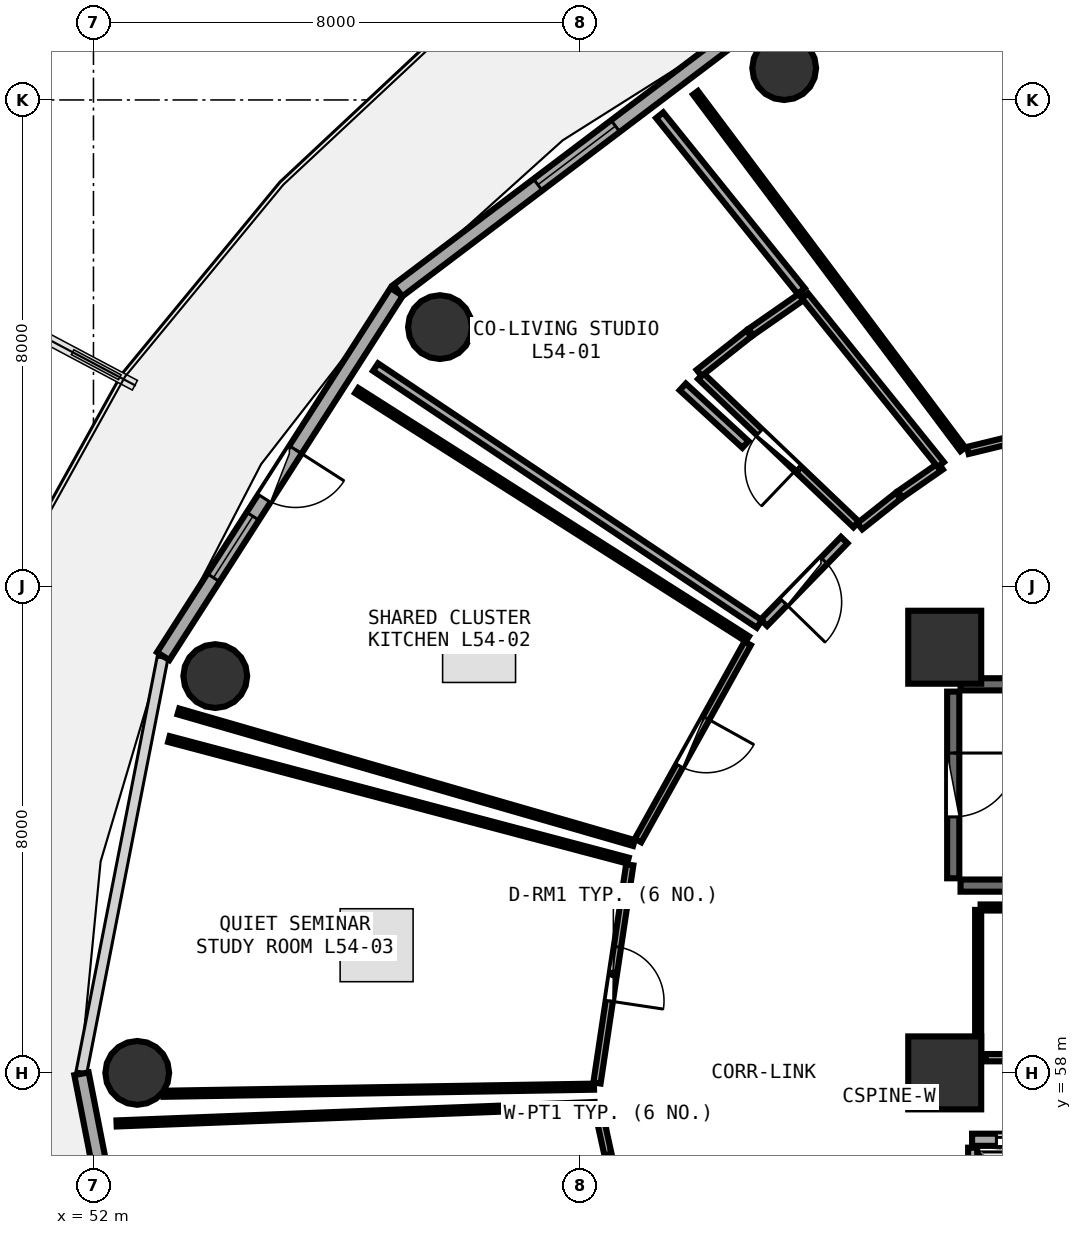
"""IFC4 building model, lengths in metres.
Left out: names, types, materials, properties, quantities, classifications, styles, units other than length and angle.
Written with IfcOpenShell. Run it as: python <this file> out.ifc"""

import sys

from ifc_helpers import new_model, si_unit, direction, frame, frame_2d, origin, origin_2d, place, context, subcontext, project, spatial, rectangle, circle, extrude, element, fill, save


model = new_model("IFC4")
c1 = context("Model", 3, precision=1e-05, world=origin(), true_north=direction((0.0, 1.0)))
c2 = subcontext(c1, "Body", "Model", "MODEL_VIEW")
j1 = project(units=[si_unit("LENGTHUNIT", "METRE"), si_unit("PLANEANGLEUNIT", "RADIAN")], contexts=[c1])
p1 = place(None, origin())
s1 = spatial("IfcSite", under=j1, at=p1, CompositionType="ELEMENT")
p2 = place(p1, origin())
s2 = spatial("IfcBuilding", under=s1, at=p2, CompositionType="ELEMENT")
p3 = place(p2, frame((0.0, 0.0, 211.95)))
s3 = spatial("IfcBuildingStorey", under=s2, at=p3, CompositionType="ELEMENT", Elevation=211.95)
for number, where, z_axis, x_axis in (
    (1, (66.0, 65.0, 0.0), (0.0, 0.0, 1.0), (1.0, 0.0, 0.0)),
    (2, (66.0, 58.0, 0.0), (0.0, 0.0, 1.0), (1.0, 0.0, 0.0)),
):
    element("IfcColumn", number, at=place(p3, frame(where, z_axis=z_axis, x_axis=x_axis)), inside=s3, PredefinedType="PILASTER", context=c2, shape_type="SweptSolid", body=[
        extrude(rectangle(XDim=1.2, YDim=1.2, at=origin_2d()), origin(), (0.0, 0.0, 1.0), 3.75),
    ])
for number, where, z_axis, x_axis in (
    (3, (63.36, 74.524, 0.0), (0.0, 0.0, 1.0), (1.0, 0.0, 0.0)),
    (4, (57.698, 70.264, 0.0), (0.0, 0.0, 1.0), (1.0, 0.0, 0.0)),
    (5, (54.003, 64.526, 0.0), (0.0, 0.0, 1.0), (1.0, 0.0, 0.0)),
    (6, (52.72, 58.0, 0.0), (0.0, 0.0, 1.0), (1.0, 0.0, 0.0)),
):
    element("IfcColumn", number, at=place(p3, frame(where, z_axis=z_axis, x_axis=x_axis)), inside=s3, PredefinedType="COLUMN", context=c2, shape_type="SweptSolid", body=[
        extrude(circle(Radius=0.525, at=origin_2d()), origin(), (0.0, 0.0, 1.0), 3.75),
    ])
p4 = place(p3, frame((62.888, 75.312, 0.0), z_axis=(0.0, 0.0, 1.0), x_axis=(-0.797701674595, -0.603052268338, 0.0)))
e7 = element("IfcWall", 7, at=p4, inside=s3, PredefinedType="SOLIDWALL", context=c2, shape_type="SweptSolid", body=[
    extrude(rectangle(XDim=7.374, YDim=0.24, at=frame_2d((3.687, 0.0))), origin(), (0.0, 0.0, 1.0), 3.475),
])
p5 = place(p4, frame((2.887, 0.0, 0.85)))
e8 = element("IfcOpeningElement", 8, at=p5, cuts=e7, PredefinedType="OPENING", context=c2, shape_type="SweptSolid", body=[
    extrude(rectangle(XDim=1.6, YDim=1.45, at=frame_2d((0.8, 0.725))), frame((0.0, 0.13, 0.0), z_axis=(0.0, -1.0, 0.0), x_axis=(1.0, 0.0, 0.0)), (0.0, 0.0, 1.0), 0.26),
])
p6 = place(p3, frame((56.986, 70.843, 0.0), z_axis=(0.0, 0.0, 1.0), x_axis=(-0.539539512973, -0.841960280501, 0.0)))
e9 = element("IfcWall", 9, at=p6, inside=s3, PredefinedType="SOLIDWALL", context=c2, shape_type="SweptSolid", body=[
    extrude(rectangle(XDim=7.115, YDim=0.24, at=frame_2d((3.557, 0.0))), origin(), (0.0, 0.0, 1.0), 3.475),
])
p7 = place(p6, frame((3.082, 0.0, 0.0)))
e10 = element("IfcOpeningElement", 10, at=p7, cuts=e9, PredefinedType="OPENING", context=c2, shape_type="SweptSolid", body=[
    extrude(rectangle(XDim=0.95, YDim=2.1, at=frame_2d((0.475, 1.05))), frame((0.0, 0.13, 0.0), z_axis=(0.0, -1.0, 0.0), x_axis=(1.0, 0.0, 0.0)), (0.0, 0.0, 1.0), 0.26),
])
p8 = place(p6, frame((4.382, 0.0, 0.85)))
e11 = element("IfcOpeningElement", 11, at=p8, cuts=e9, PredefinedType="OPENING", context=c2, shape_type="SweptSolid", body=[
    extrude(rectangle(XDim=1.2, YDim=1.45, at=frame_2d((0.6, 0.725))), frame((0.0, 0.13, 0.0), z_axis=(0.0, -1.0, 0.0), x_axis=(1.0, 0.0, 0.0)), (0.0, 0.0, 1.0), 0.26),
])
p9 = place(p3, frame((51.803, 57.985, 0.0), z_axis=(0.0, 0.0, 1.0), x_axis=(0.192069055673, -0.981381413036, 0.0)))
e12 = element("IfcWall", 12, at=p9, inside=s3, PredefinedType="SOLIDWALL", context=c2, shape_type="SweptSolid", body=[
    extrude(rectangle(XDim=6.94, YDim=0.24, at=frame_2d((3.47, 0.0))), origin(), (0.0, 0.0, 1.0), 3.475),
])
p10 = place(p9, frame((2.67, 0.0, 0.85)))
e13 = element("IfcOpeningElement", 13, at=p10, cuts=e12, PredefinedType="OPENING", context=c2, shape_type="SweptSolid", body=[
    extrude(rectangle(XDim=1.6, YDim=1.45, at=frame_2d((0.8, 0.725))), frame((0.0, 0.13, 0.0), z_axis=(0.0, -1.0, 0.0), x_axis=(1.0, 0.0, 0.0)), (0.0, 0.0, 1.0), 0.26),
])
for number, where, z_axis, x_axis in (
    (14, (66.26, 61.08, 0.0), (0.0, 0.0, 1.0), (1.0, 0.0, 0.0)),
    (15, (73.42, 64.39, 0.0), (0.0, 0.0, 1.0), (-1.0, 0.0, 0.0)),
):
    element("IfcWall", number, at=place(p3, frame(where, z_axis=z_axis, x_axis=x_axis)), inside=s3, PredefinedType="SHEAR", context=c2, shape_type="SweptSolid", body=[
        extrude(rectangle(XDim=7.16, YDim=0.2, at=frame_2d((3.58, 0.0))), origin(), (0.0, 0.0, 1.0), 3.49),
    ])
p11 = place(p3, frame((66.14, 64.27, 0.0), z_axis=(0.0, 0.0, 1.0), x_axis=(0.0, -1.0, 0.0)))
e16 = element("IfcWall", 16, at=p11, inside=s3, PredefinedType="SHEAR", context=c2, shape_type="SweptSolid", body=[
    extrude(rectangle(XDim=3.07, YDim=0.2, at=frame_2d((1.535, 0.0))), origin(), (0.0, 0.0, 1.0), 3.49),
])
p12 = place(p11, frame((1.01, 0.0, 0.0)))
e17 = element("IfcOpeningElement", 17, at=p12, cuts=e16, PredefinedType="OPENING", context=c2, shape_type="SweptSolid", body=[
    extrude(rectangle(XDim=1.05, YDim=2.1, at=frame_2d((0.525, 1.05))), frame((0.0, 0.11, 0.0), z_axis=(0.0, -1.0, 0.0), x_axis=(1.0, 0.0, 0.0)), (0.0, 0.0, 1.0), 0.22),
])
p13 = place(p3, frame((66.45, 56.9, 0.0), z_axis=(0.0, 0.0, 1.0), x_axis=(1.0, 0.0, 0.0)))
e18 = element("IfcWall", 18, at=p13, inside=s3, PredefinedType="SOLIDWALL", context=c2, shape_type="SweptSolid", body=[
    extrude(rectangle(XDim=14.4, YDim=0.2, at=frame_2d((7.2, 0.0))), origin(), (0.0, 0.0, 1.0), 3.48),
])
p14 = place(p13, frame((0.4, 0.0, 0.0)))
e19 = element("IfcOpeningElement", 19, at=p14, cuts=e18, PredefinedType="OPENING", context=c2, shape_type="SweptSolid", body=[
    extrude(rectangle(XDim=1.1, YDim=2.1, at=frame_2d((0.55, 1.05))), frame((0.0, 0.11, 0.0), z_axis=(0.0, -1.0, 0.0), x_axis=(1.0, 0.0, 0.0)), (0.0, 0.0, 1.0), 0.22),
])
p15 = place(p13, frame((2.4, 0.0, 0.0)))
e20 = element("IfcOpeningElement", 20, at=p15, cuts=e18, PredefinedType="OPENING", context=c2, shape_type="SweptSolid", body=[
    extrude(rectangle(XDim=1.1, YDim=2.1, at=frame_2d((0.55, 1.05))), frame((0.0, 0.11, 0.0), z_axis=(0.0, -1.0, 0.0), x_axis=(1.0, 0.0, 0.0)), (0.0, 0.0, 1.0), 0.22),
])
p16 = place(p13, frame((4.4, 0.0, 0.0)))
e21 = element("IfcOpeningElement", 21, at=p16, cuts=e18, PredefinedType="OPENING", context=c2, shape_type="SweptSolid", body=[
    extrude(rectangle(XDim=1.1, YDim=2.1, at=frame_2d((0.55, 1.05))), frame((0.0, 0.11, 0.0), z_axis=(0.0, -1.0, 0.0), x_axis=(1.0, 0.0, 0.0)), (0.0, 0.0, 1.0), 0.22),
])
p17 = place(p3, frame((66.46, 54.48, 0.0), z_axis=(0.0, 0.0, 1.0), x_axis=(0.0, 1.0, 0.0)))
e22 = element("IfcWall", 22, at=p17, inside=s3, PredefinedType="PARTITIONING", context=c2, shape_type="SweptSolid", body=[
    extrude(rectangle(XDim=2.29, YDim=0.15, at=frame_2d((1.145, 0.0))), origin(), (0.0, 0.0, 1.0), 3.48),
])
p18 = place(p3, frame((66.675, 58.25, 0.0), z_axis=(0.0, 0.0, 1.0), x_axis=(1.0, 0.0, 0.0)))
e23 = element("IfcWall", 23, at=p18, inside=s3, PredefinedType="PARTITIONING", context=c2, shape_type="SweptSolid", body=[
    extrude(rectangle(XDim=3.265, YDim=0.12, at=frame_2d((1.632, 0.0))), origin(), (0.0, 0.0, 1.0), 3.48),
])
p19 = place(p18, frame((1.182, 0.0, 0.0)))
e24 = element("IfcOpeningElement", 24, at=p19, cuts=e23, PredefinedType="OPENING", context=c2, shape_type="SweptSolid", body=[
    extrude(rectangle(XDim=0.9, YDim=2.08, at=frame_2d((0.45, 1.04))), frame((0.0, 0.07, 0.0), z_axis=(0.0, -1.0, 0.0), x_axis=(1.0, 0.0, 0.0)), (0.0, 0.0, 1.0), 0.14),
])
p20 = place(p3, frame((74.84, 70.29, 0.0), z_axis=(0.0, 0.0, 1.0), x_axis=(-0.971771434763, -0.235924306884, 0.0)))
e25 = element("IfcWall", 25, at=p20, inside=s3, PredefinedType="PARTITIONING", context=c2, shape_type="SweptSolid", body=[
    extrude(rectangle(XDim=8.705, YDim=0.12, at=frame_2d((4.353, 0.0))), origin(), (0.0, 0.0, 1.0), 3.025),
])
p21 = place(p20, frame((3.903, 0.0, 0.0)))
e26 = element("IfcOpeningElement", 26, at=p21, cuts=e25, PredefinedType="OPENING", context=c2, shape_type="SweptSolid", body=[
    extrude(rectangle(XDim=0.9, YDim=2.08, at=frame_2d((0.45, 1.04))), frame((0.0, 0.07, 0.0), z_axis=(0.0, -1.0, 0.0), x_axis=(1.0, 0.0, 0.0)), (0.0, 0.0, 1.0), 0.14),
])
p22 = place(p3, frame((64.545, 67.018, 0.0), z_axis=(0.0, 0.0, 1.0), x_axis=(-0.723495138875, 0.690329474979, 0.0)))
e27 = element("IfcWall", 27, at=p22, inside=s3, PredefinedType="PLUMBINGWALL", context=c2, shape_type="SweptSolid", body=[
    extrude(rectangle(XDim=3.533, YDim=0.13, at=frame_2d((1.767, 0.0))), origin(), (0.0, 0.0, 1.0), 3.175),
])
p23 = place(p22, frame((1.337, 0.0, 0.0)))
e28 = element("IfcOpeningElement", 28, at=p23, cuts=e27, PredefinedType="OPENING", context=c2, shape_type="SweptSolid", body=[
    extrude(rectangle(XDim=0.86, YDim=2.05, at=frame_2d((0.43, 1.025))), frame((0.0, 0.075, 0.0), z_axis=(0.0, -1.0, 0.0), x_axis=(1.0, 0.0, 0.0)), (0.0, 0.0, 1.0), 0.15),
])
p24 = place(p3, frame((64.347, 66.762, 0.0), z_axis=(0.0, 0.0, 1.0), x_axis=(-0.697118859216, -0.716955574722, 0.0)))
e29 = element("IfcWall", 29, at=p24, inside=s3, PredefinedType="PARTITIONING", context=c2, shape_type="SweptSolid", body=[
    extrude(rectangle(XDim=1.895, YDim=0.15, at=frame_2d((0.948, 0.0))), origin(), (0.0, 0.0, 1.0), 3.025),
])
p25 = place(p24, frame((0.473, 0.0, 0.0)))
e30 = element("IfcOpeningElement", 30, at=p25, cuts=e29, PredefinedType="OPENING", context=c2, shape_type="SweptSolid", body=[
    extrude(rectangle(XDim=0.95, YDim=2.08, at=frame_2d((0.475, 1.04))), frame((0.0, 0.085, 0.0), z_axis=(0.0, -1.0, 0.0), x_axis=(1.0, 0.0, 0.0)), (0.0, 0.0, 1.0), 0.17),
])
p26 = place(p3, frame((62.759, 65.064, 0.0), z_axis=(0.0, 0.0, 1.0), x_axis=(-0.485877595764, -0.874026865683, 0.0)))
e31 = element("IfcWall", 31, at=p26, inside=s3, PredefinedType="PARTITIONING", context=c2, shape_type="SweptSolid", body=[
    extrude(rectangle(XDim=3.71, YDim=0.12, at=frame_2d((1.855, 0.0))), origin(), (0.0, 0.0, 1.0), 3.025),
])
p27 = place(p26, frame((1.405, 0.0, 0.0)))
e32 = element("IfcOpeningElement", 32, at=p27, cuts=e31, PredefinedType="OPENING", context=c2, shape_type="SweptSolid", body=[
    extrude(rectangle(XDim=0.9, YDim=2.08, at=frame_2d((0.45, 1.04))), frame((0.0, 0.07, 0.0), z_axis=(0.0, -1.0, 0.0), x_axis=(1.0, 0.0, 0.0)), (0.0, 0.0, 1.0), 0.14),
])
p28 = place(p3, frame((60.82, 61.422, 0.0), z_axis=(0.0, 0.0, 1.0), x_axis=(-0.148557592641, -0.988903757536, 0.0)))
e33 = element("IfcWall", 33, at=p28, inside=s3, PredefinedType="PARTITIONING", context=c2, shape_type="SweptSolid", body=[
    extrude(rectangle(XDim=3.629, YDim=0.12, at=frame_2d((1.814, 0.0))), origin(), (0.0, 0.0, 1.0), 3.025),
])
p29 = place(p28, frame((1.364, 0.0, 0.0)))
e34 = element("IfcOpeningElement", 34, at=p29, cuts=e33, PredefinedType="OPENING", context=c2, shape_type="SweptSolid", body=[
    extrude(rectangle(XDim=0.9, YDim=2.08, at=frame_2d((0.45, 1.04))), frame((0.0, 0.07, 0.0), z_axis=(0.0, -1.0, 0.0), x_axis=(1.0, 0.0, 0.0)), (0.0, 0.0, 1.0), 0.14),
])
p30 = place(p3, frame((60.296, 57.414, 0.0), z_axis=(0.0, 0.0, 1.0), x_axis=(0.214769597133, -0.976664742963, 0.0)))
e35 = element("IfcWall", 35, at=p30, inside=s3, PredefinedType="PARTITIONING", context=c2, shape_type="SweptSolid", body=[
    extrude(rectangle(XDim=3.638, YDim=0.12, at=frame_2d((1.819, 0.0))), origin(), (0.0, 0.0, 1.0), 3.48),
])
p31 = place(p30, frame((1.369, 0.0, 0.0)))
e36 = element("IfcOpeningElement", 36, at=p31, cuts=e35, PredefinedType="OPENING", context=c2, shape_type="SweptSolid", body=[
    extrude(rectangle(XDim=0.9, YDim=2.08, at=frame_2d((0.45, 1.04))), frame((0.0, 0.07, 0.0), z_axis=(0.0, -1.0, 0.0), x_axis=(1.0, 0.0, 0.0)), (0.0, 0.0, 1.0), 0.14),
])
p32 = place(p3, frame((69.96, 60.72, 0.0), z_axis=(0.0, 0.0, 1.0), x_axis=(-1.0, 0.0, 0.0)))
e37 = element("IfcWall", 37, at=p32, inside=s3, PredefinedType="PARTITIONING", context=c2, shape_type="SweptSolid", body=[
    extrude(rectangle(XDim=3.37, YDim=0.1, at=frame_2d((1.685, 0.0))), origin(), (0.0, 0.0, 1.0), 3.48),
])
p33 = place(p3, frame((66.55, 60.68, 0.0), z_axis=(0.0, 0.0, 1.0), x_axis=(0.0, -1.0, 0.0)))
e38 = element("IfcWall", 38, at=p33, inside=s3, PredefinedType="PARTITIONING", context=c2, shape_type="SweptSolid", body=[
    extrude(rectangle(XDim=2.383, YDim=0.1, at=frame_2d((1.191, 0.0))), origin(), (0.0, 0.0, 1.0), 3.48),
])
p34 = place(p3, frame((66.298, 68.254, 0.0), z_axis=(0.0, 0.0, 1.0), x_axis=(-0.599930714763, 0.80005195924, 0.0)))
e39 = element("IfcWall", 39, at=p34, inside=s3, PredefinedType="PARTITIONING", context=c2, shape_type="SweptSolid", body=[
    extrude(rectangle(XDim=7.33, YDim=0.1, at=frame_2d((3.665, 0.0))), origin(), (0.0, 0.0, 1.0), 3.025),
])
p35 = place(p3, frame((65.933, 67.977, 0.0), z_axis=(0.0, 0.0, 1.0), x_axis=(-0.821107527055, -0.570773535663, 0.0)))
e40 = element("IfcWall", 40, at=p35, inside=s3, PredefinedType="PLUMBINGWALL", context=c2, shape_type="SweptSolid", body=[
    extrude(rectangle(XDim=0.812, YDim=0.13, at=frame_2d((0.406, 0.0))), origin(), (0.0, 0.0, 1.0), 3.025),
])
p36 = place(p3, frame((65.234, 67.49, 0.0), z_axis=(0.0, 0.0, 1.0), x_axis=(-0.783584251465, -0.621285538908, 0.0)))
e41 = element("IfcWall", 41, at=p36, inside=s3, PredefinedType="PLUMBINGWALL", context=c2, shape_type="SweptSolid", body=[
    extrude(rectangle(XDim=0.805, YDim=0.13, at=frame_2d((0.402, 0.0))), origin(), (0.0, 0.0, 1.0), 3.025),
])
p37 = place(p3, frame((61.961, 69.511, 0.0), z_axis=(0.0, 0.0, 1.0), x_axis=(0.784079055359, 0.620660966186, 0.0)))
e42 = element("IfcWall", 42, at=p37, inside=s3, PredefinedType="PLUMBINGWALL", context=c2, shape_type="SweptSolid", body=[
    extrude(rectangle(XDim=1.043, YDim=0.13, at=frame_2d((0.521, 0.0))), origin(), (0.0, 0.0, 1.0), 3.48),
])
p38 = place(p3, frame((62.81, 70.182, 0.0), z_axis=(0.0, 0.0, 1.0), x_axis=(0.820692025527, 0.571370807127, 0.0)))
e43 = element("IfcWall", 43, at=p38, inside=s3, PredefinedType="PLUMBINGWALL", context=c2, shape_type="SweptSolid", body=[
    extrude(rectangle(XDim=1.051, YDim=0.13, at=frame_2d((0.525, 0.0))), origin(), (0.0, 0.0, 1.0), 3.48),
])
p39 = place(p3, frame((63.701, 70.778, 0.0), z_axis=(0.0, 0.0, 1.0), x_axis=(0.627323766187, -0.778758558461, 0.0)))
e44 = element("IfcWall", 44, at=p39, inside=s3, PredefinedType="PLUMBINGWALL", context=c2, shape_type="SweptSolid", body=[
    extrude(rectangle(XDim=3.563, YDim=0.13, at=frame_2d((1.781, 0.0))), origin(), (0.0, 0.0, 1.0), 3.025),
])
p40 = place(p3, frame((62.951, 65.382, 0.0), z_axis=(0.0, 0.0, 1.0), x_axis=(-0.831079650143, 0.556153409697, 0.0)))
e45 = element("IfcWall", 45, at=p40, inside=s3, PredefinedType="PARTITIONING", context=c2, shape_type="SweptSolid", body=[
    extrude(rectangle(XDim=7.594, YDim=0.15, at=frame_2d((3.797, 0.0))), origin(), (0.0, 0.0, 1.0), 3.075),
])
p41 = place(p3, frame((61.312, 73.749, 0.0), z_axis=(0.0, 0.0, 1.0), x_axis=(0.627090198143, -0.778946649901, 0.0)))
e46 = element("IfcWall", 46, at=p41, inside=s3, PredefinedType="PARTITIONING", context=c2, shape_type="SweptSolid", body=[
    extrude(rectangle(XDim=3.712, YDim=0.15, at=frame_2d((1.856, 0.0))), origin(), (0.0, 0.0, 1.0), 3.075),
])
p42 = place(p3, frame((61.691, 69.281, 0.0), z_axis=(0.0, 0.0, 1.0), x_axis=(0.736726740779, -0.676190586611, 0.0)))
e47 = element("IfcWall", 47, at=p42, inside=s3, PredefinedType="PARTITIONING", context=c2, shape_type="SweptSolid", body=[
    extrude(rectangle(XDim=1.399, YDim=0.15, at=frame_2d((0.7, 0.0))), origin(), (0.0, 0.0, 1.0), 3.175),
])
p43 = place(p3, frame((60.889, 61.78, 0.0), z_axis=(0.0, 0.0, 1.0), x_axis=(-0.960734399679, 0.277469661899, 0.0)))
e48 = element("IfcWall", 48, at=p43, inside=s3, PredefinedType="PARTITIONING", context=c2, shape_type="SweptSolid", body=[
    extrude(rectangle(XDim=7.798, YDim=0.1, at=frame_2d((3.899, 0.0))), origin(), (0.0, 0.0, 1.0), 3.075),
])
p44 = place(p3, frame((56.329, 69.221, 0.0), z_axis=(0.0, 0.0, 1.0), x_axis=(0.843949218332, -0.536423076383, 0.0)))
e49 = element("IfcWall", 49, at=p44, inside=s3, PredefinedType="PARTITIONING", context=c2, shape_type="SweptSolid", body=[
    extrude(rectangle(XDim=7.613, YDim=0.1, at=frame_2d((3.807, 0.0))), origin(), (0.0, 0.0, 1.0), 3.075),
])
p45 = place(p3, frame((60.232, 57.773, 0.0), z_axis=(0.0, 0.0, 1.0), x_axis=(-0.999864271248, -0.016475408379, 0.0)))
e50 = element("IfcWall", 50, at=p45, inside=s3, PredefinedType="PARTITIONING", context=c2, shape_type="SweptSolid", body=[
    extrude(rectangle(XDim=7.083, YDim=0.1, at=frame_2d((3.542, 0.0))), origin(), (0.0, 0.0, 1.0), 3.175),
])
p46 = place(p3, frame((53.241, 63.49, 0.0), z_axis=(0.0, 0.0, 1.0), x_axis=(0.966701361123, -0.25590716755, 0.0)))
e51 = element("IfcWall", 51, at=p46, inside=s3, PredefinedType="PARTITIONING", context=c2, shape_type="SweptSolid", body=[
    extrude(rectangle(XDim=7.81, YDim=0.1, at=frame_2d((3.905, 0.0))), origin(), (0.0, 0.0, 1.0), 3.075),
])
p47 = place(p3, frame((52.38, 57.168, 0.0), z_axis=(0.0, 0.0, 1.0), x_axis=(0.999258468257, 0.038503423452, 0.0)))
e52 = element("IfcWall", 52, at=p47, inside=s3, PredefinedType="PARTITIONING", context=c2, shape_type="SweptSolid", body=[
    extrude(rectangle(XDim=7.869, YDim=0.1, at=frame_2d((3.935, 0.0))), origin(), (0.0, 0.0, 1.0), 3.075),
])
p48 = place(p5, origin())
e53 = element("IfcWindow", 53, at=p48, inside=s3, PartitioningType="SINGLE_PANEL", PredefinedType="WINDOW", context=c2, shape_type="SweptSolid", body=[
    extrude(rectangle(XDim=1.6, YDim=1.45, at=frame_2d((0.8, 0.725))), frame((0.0, 0.03, 0.0), z_axis=(0.0, -1.0, 0.0), x_axis=(1.0, 0.0, 0.0)), (0.0, 0.0, 1.0), 0.06),
])
fill(e8, e53)
p49 = place(p7, frame((0.95, 0.0, 0.0), z_axis=(0.0, 0.0, 1.0), x_axis=(-1.0, 0.0, 0.0)))
e54 = element("IfcDoor", 54, at=p49, inside=s3, OperationType="SINGLE_SWING_RIGHT", PredefinedType="DOOR", context=c2, shape_type="SweptSolid", body=[
    extrude(rectangle(XDim=0.95, YDim=2.1, at=frame_2d((0.475, 1.05))), frame((0.0, 0.025, 0.0), z_axis=(0.0, -1.0, 0.0), x_axis=(1.0, 0.0, 0.0)), (0.0, 0.0, 1.0), 0.05),
])
fill(e10, e54)
p50 = place(p8, origin())
e55 = element("IfcWindow", 55, at=p50, inside=s3, PartitioningType="SINGLE_PANEL", PredefinedType="WINDOW", context=c2, shape_type="SweptSolid", body=[
    extrude(rectangle(XDim=1.2, YDim=1.45, at=frame_2d((0.6, 0.725))), frame((0.0, 0.03, 0.0), z_axis=(0.0, -1.0, 0.0), x_axis=(1.0, 0.0, 0.0)), (0.0, 0.0, 1.0), 0.06),
])
fill(e11, e55)
p51 = place(p12, origin())
e56 = element("IfcDoor", 56, at=p51, inside=s3, OperationType="SINGLE_SWING_LEFT", PredefinedType="DOOR", context=c2, shape_type="SweptSolid", body=[
    extrude(rectangle(XDim=1.05, YDim=2.1, at=frame_2d((0.525, 1.05))), frame((0.0, 0.025, 0.0), z_axis=(0.0, -1.0, 0.0), x_axis=(1.0, 0.0, 0.0)), (0.0, 0.0, 1.0), 0.05),
])
fill(e17, e56)
p52 = place(p14, origin())
e57 = element("IfcDoor", 57, at=p52, inside=s3, OperationType="DOUBLE_DOOR_SLIDING", PredefinedType="DOOR", context=c2, shape_type="SweptSolid", body=[
    extrude(rectangle(XDim=1.1, YDim=2.1, at=frame_2d((0.55, 1.05))), frame((0.0, 0.025, 0.0), z_axis=(0.0, -1.0, 0.0), x_axis=(1.0, 0.0, 0.0)), (0.0, 0.0, 1.0), 0.05),
])
fill(e19, e57)
p53 = place(p23, origin())
e58 = element("IfcDoor", 58, at=p53, inside=s3, OperationType="SINGLE_SWING_LEFT", PredefinedType="DOOR", context=c2, shape_type="SweptSolid", body=[
    extrude(rectangle(XDim=0.86, YDim=2.05, at=frame_2d((0.43, 1.025))), frame((0.0, 0.025, 0.0), z_axis=(0.0, -1.0, 0.0), x_axis=(1.0, 0.0, 0.0)), (0.0, 0.0, 1.0), 0.05),
])
fill(e28, e58)
p54 = place(p25, origin())
e59 = element("IfcDoor", 59, at=p54, inside=s3, OperationType="SINGLE_SWING_RIGHT", PredefinedType="DOOR", context=c2, shape_type="SweptSolid", body=[
    extrude(rectangle(XDim=0.95, YDim=2.08, at=frame_2d((0.475, 1.04))), frame((0.0, 0.025, 0.0), z_axis=(0.0, -1.0, 0.0), x_axis=(1.0, 0.0, 0.0)), (0.0, 0.0, 1.0), 0.05),
])
fill(e30, e59)
p55 = place(p27, origin())
e60 = element("IfcDoor", 60, at=p55, inside=s3, OperationType="SINGLE_SWING_LEFT", PredefinedType="DOOR", context=c2, shape_type="SweptSolid", body=[
    extrude(rectangle(XDim=0.9, YDim=2.08, at=frame_2d((0.45, 1.04))), frame((0.0, 0.025, 0.0), z_axis=(0.0, -1.0, 0.0), x_axis=(1.0, 0.0, 0.0)), (0.0, 0.0, 1.0), 0.05),
])
fill(e32, e60)
p56 = place(p29, origin())
e61 = element("IfcDoor", 61, at=p56, inside=s3, OperationType="SINGLE_SWING_RIGHT", PredefinedType="DOOR", context=c2, shape_type="SweptSolid", body=[
    extrude(rectangle(XDim=0.9, YDim=2.08, at=frame_2d((0.45, 1.04))), frame((0.0, 0.025, 0.0), z_axis=(0.0, -1.0, 0.0), x_axis=(1.0, 0.0, 0.0)), (0.0, 0.0, 1.0), 0.05),
])
fill(e34, e61)
save(model, sys.argv[1])
